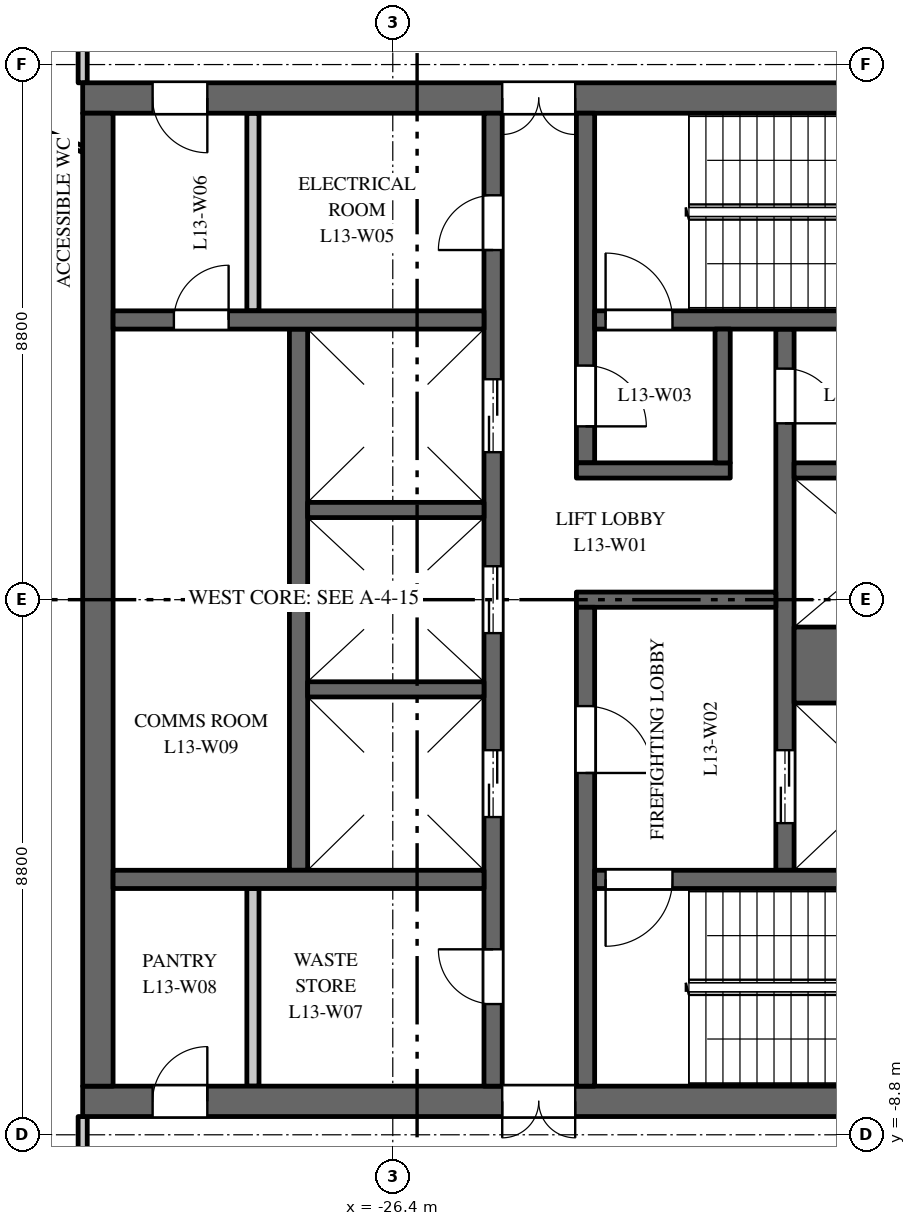
"""IFC4 building model, lengths in metres.
Left out: names, types, materials, properties, quantities, classifications, styles, units other than length and angle.
Written with IfcOpenShell. Run it as: python <this file> out.ifc"""

import sys

from ifc_helpers import new_model, si_unit, direction, frame, frame_2d, origin, place, context, subcontext, project, spatial, rectangle, extrude, element, fill, save


model = new_model("IFC4")
c1 = context("Model", 3, precision=1e-05, world=origin(), true_north=direction((0.0, 1.0)))
c2 = subcontext(c1, "Body", "Model", "MODEL_VIEW")
j1 = project(units=[si_unit("LENGTHUNIT", "METRE"), si_unit("PLANEANGLEUNIT", "RADIAN")], contexts=[c1])
p1 = place(None, origin())
s1 = spatial("IfcSite", under=j1, at=p1, CompositionType="ELEMENT")
p2 = place(p1, origin())
s2 = spatial("IfcBuilding", under=s1, at=p2, CompositionType="ELEMENT")
p3 = place(p2, frame((0.0, 0.0, 62.5)))
s3 = spatial("IfcBuildingStorey", under=s2, at=p3, CompositionType="ELEMENT", Elevation=62.5)
p4 = place(p3, frame((-16.5, 8.25, 0.0), z_axis=(0.0, 0.0, 1.0), x_axis=(-1.0, 0.0, 0.0)))
e1 = element("IfcWall", 1, at=p4, inside=s3, PredefinedType="SHEAR", context=c2, shape_type="SweptSolid", body=[
    extrude(rectangle(XDim=15.0, YDim=0.5, at=frame_2d((7.5, 0.0))), origin(), (0.0, 0.0, 1.0), 3.7),
])
p5 = place(p4, frame((6.9, 0.0, 0.0)))
e2 = element("IfcOpeningElement", 2, at=p5, cuts=e1, PredefinedType="OPENING", context=c2, shape_type="SweptSolid", body=[
    extrude(rectangle(XDim=1.2, YDim=2.1, at=frame_2d((0.6, 1.05))), frame((0.0, 0.26, 0.0), z_axis=(0.0, -1.0, 0.0), x_axis=(1.0, 0.0, 0.0)), (0.0, 0.0, 1.0), 0.52),
])
p6 = place(p4, frame((12.95, 0.0, 0.0)))
e3 = element("IfcOpeningElement", 3, at=p6, cuts=e1, PredefinedType="OPENING", context=c2, shape_type="SweptSolid", body=[
    extrude(rectangle(XDim=0.9, YDim=2.1, at=frame_2d((0.45, 1.05))), frame((0.0, 0.26, 0.0), z_axis=(0.0, -1.0, 0.0), x_axis=(1.0, 0.0, 0.0)), (0.0, 0.0, 1.0), 0.52),
])
p7 = place(p3, frame((-16.5, -8.25, 0.0), z_axis=(0.0, 0.0, 1.0), x_axis=(-1.0, 0.0, 0.0)))
e4 = element("IfcWall", 4, at=p7, inside=s3, PredefinedType="SHEAR", context=c2, shape_type="SweptSolid", body=[
    extrude(rectangle(XDim=15.0, YDim=0.5, at=frame_2d((7.5, 0.0))), origin(), (0.0, 0.0, 1.0), 3.7),
])
p8 = place(p7, frame((6.9, 0.0, 0.0)))
e5 = element("IfcOpeningElement", 5, at=p8, cuts=e4, PredefinedType="OPENING", context=c2, shape_type="SweptSolid", body=[
    extrude(rectangle(XDim=1.2, YDim=2.1, at=frame_2d((0.6, 1.05))), frame((0.0, 0.26, 0.0), z_axis=(0.0, -1.0, 0.0), x_axis=(1.0, 0.0, 0.0)), (0.0, 0.0, 1.0), 0.52),
])
p9 = place(p7, frame((12.95, 0.0, 0.0)))
e6 = element("IfcOpeningElement", 6, at=p9, cuts=e4, PredefinedType="OPENING", context=c2, shape_type="SweptSolid", body=[
    extrude(rectangle(XDim=0.9, YDim=2.1, at=frame_2d((0.45, 1.05))), frame((0.0, 0.26, 0.0), z_axis=(0.0, -1.0, 0.0), x_axis=(1.0, 0.0, 0.0)), (0.0, 0.0, 1.0), 0.52),
])
p10 = place(p3, frame((-27.95, -4.45, 0.0), z_axis=(0.0, 0.0, 1.0), x_axis=(0.0, 1.0, 0.0)))
e7 = element("IfcWall", 7, at=p10, inside=s3, PredefinedType="SHEAR", context=c2, shape_type="SweptSolid", body=[
    extrude(rectangle(XDim=8.9, YDim=0.3, at=frame_2d((4.45, 0.0))), origin(), (0.0, 0.0, 1.0), 3.7),
])
p11 = place(p3, frame((-19.95, -4.45, 0.0), z_axis=(0.0, 0.0, 1.0), x_axis=(0.0, 1.0, 0.0)))
e8 = element("IfcWall", 8, at=p11, inside=s3, PredefinedType="SHEAR", context=c2, shape_type="SweptSolid", body=[
    extrude(rectangle(XDim=8.9, YDim=0.3, at=frame_2d((4.45, 0.0))), origin(), (0.0, 0.0, 1.0), 3.7),
])
p12 = place(p11, frame((0.775, 0.0, 0.0)))
e9 = element("IfcOpeningElement", 9, at=p12, cuts=e8, PredefinedType="OPENING", context=c2, shape_type="SweptSolid", body=[
    extrude(rectangle(XDim=1.2, YDim=2.1, at=frame_2d((0.6, 1.05))), frame((0.0, 0.16, 0.0), z_axis=(0.0, -1.0, 0.0), x_axis=(1.0, 0.0, 0.0)), (0.0, 0.0, 1.0), 0.32),
])
p13 = place(p11, frame((7.35, 0.0, 0.0)))
e10 = element("IfcOpeningElement", 10, at=p13, cuts=e8, PredefinedType="OPENING", context=c2, shape_type="SweptSolid", body=[
    extrude(rectangle(XDim=0.9, YDim=2.1, at=frame_2d((0.45, 1.05))), frame((0.0, 0.16, 0.0), z_axis=(0.0, -1.0, 0.0), x_axis=(1.0, 0.0, 0.0)), (0.0, 0.0, 1.0), 0.32),
])
p14 = place(p3, frame((-24.75, -8.0, 0.0), z_axis=(0.0, 0.0, 1.0), x_axis=(0.0, 1.0, 0.0)))
e11 = element("IfcWall", 11, at=p14, inside=s3, PredefinedType="SHEAR", context=c2, shape_type="SweptSolid", body=[
    extrude(rectangle(XDim=16.0, YDim=0.3, at=frame_2d((8.0, 0.0))), origin(), (0.0, 0.0, 1.0), 3.7),
])
p15 = place(p14, frame((4.425, 0.0, 0.0)))
e12 = element("IfcOpeningElement", 12, at=p15, cuts=e11, PredefinedType="OPENING", context=c2, shape_type="SweptSolid", body=[
    extrude(rectangle(XDim=1.1, YDim=2.1, at=frame_2d((0.55, 1.05))), frame((0.0, 0.16, 0.0), z_axis=(0.0, -1.0, 0.0), x_axis=(1.0, 0.0, 0.0)), (0.0, 0.0, 1.0), 0.32),
])
p16 = place(p14, frame((7.45, 0.0, 0.0)))
e13 = element("IfcOpeningElement", 13, at=p16, cuts=e11, PredefinedType="OPENING", context=c2, shape_type="SweptSolid", body=[
    extrude(rectangle(XDim=1.1, YDim=2.1, at=frame_2d((0.55, 1.05))), frame((0.0, 0.16, 0.0), z_axis=(0.0, -1.0, 0.0), x_axis=(1.0, 0.0, 0.0)), (0.0, 0.0, 1.0), 0.32),
])
p17 = place(p14, frame((10.425, 0.0, 0.0)))
e14 = element("IfcOpeningElement", 14, at=p17, cuts=e11, PredefinedType="OPENING", context=c2, shape_type="SweptSolid", body=[
    extrude(rectangle(XDim=1.2, YDim=2.1, at=frame_2d((0.6, 1.05))), frame((0.0, 0.16, 0.0), z_axis=(0.0, -1.0, 0.0), x_axis=(1.0, 0.0, 0.0)), (0.0, 0.0, 1.0), 0.32),
])
p18 = place(p14, frame((13.75, 0.0, 0.0)))
e15 = element("IfcOpeningElement", 15, at=p18, cuts=e11, PredefinedType="OPENING", context=c2, shape_type="SweptSolid", body=[
    extrude(rectangle(XDim=0.9, YDim=2.1, at=frame_2d((0.45, 1.05))), frame((0.0, 0.16, 0.0), z_axis=(0.0, -1.0, 0.0), x_axis=(1.0, 0.0, 0.0)), (0.0, 0.0, 1.0), 0.32),
])
p19 = place(p14, frame((1.35, 0.0, 0.0)))
e16 = element("IfcOpeningElement", 16, at=p19, cuts=e11, PredefinedType="OPENING", context=c2, shape_type="SweptSolid", body=[
    extrude(rectangle(XDim=0.9, YDim=2.1, at=frame_2d((0.45, 1.05))), frame((0.0, 0.16, 0.0), z_axis=(0.0, -1.0, 0.0), x_axis=(1.0, 0.0, 0.0)), (0.0, 0.0, 1.0), 0.32),
])
p20 = place(p3, frame((-20.1, 0.0, 0.0), z_axis=(0.0, 0.0, 1.0), x_axis=(-1.0, 0.0, 0.0)))
e17 = element("IfcWall", 17, at=p20, inside=s3, PredefinedType="SHEAR", context=c2, shape_type="SweptSolid", body=[
    extrude(rectangle(XDim=3.28, YDim=0.25, at=frame_2d((1.64, 0.0))), origin(), (0.0, 0.0, 1.0), 3.7),
])
p21 = place(p3, frame((-31.25, -8.0, 0.0), z_axis=(0.0, 0.0, 1.0), x_axis=(0.0, 1.0, 0.0)))
e18 = element("IfcWall", 18, at=p21, inside=s3, PredefinedType="SHEAR", context=c2, shape_type="SweptSolid", body=[
    extrude(rectangle(XDim=16.0, YDim=0.5, at=frame_2d((8.0, 0.0))), origin(), (0.0, 0.0, 1.0), 3.7),
])
p22 = place(p3, frame((-24.9, 4.6, 0.0), z_axis=(0.0, 0.0, 1.0), x_axis=(-1.0, 0.0, 0.0)))
e19 = element("IfcWall", 19, at=p22, inside=s3, PredefinedType="SHEAR", context=c2, shape_type="SweptSolid", body=[
    extrude(rectangle(XDim=6.1, YDim=0.3, at=frame_2d((3.05, 0.0))), origin(), (0.0, 0.0, 1.0), 3.7),
])
p23 = place(p22, frame((4.2, 0.0, 0.0)))
e20 = element("IfcOpeningElement", 20, at=p23, cuts=e19, PredefinedType="OPENING", context=c2, shape_type="SweptSolid", body=[
    extrude(rectangle(XDim=0.9, YDim=2.1, at=frame_2d((0.45, 1.05))), frame((0.0, 0.16, 0.0), z_axis=(0.0, -1.0, 0.0), x_axis=(1.0, 0.0, 0.0)), (0.0, 0.0, 1.0), 0.32),
])
for number, where, z_axis, x_axis in (
    (21, (-28.7, 4.75, 0.0), (0.0, 0.0, 1.0), (0.0, 1.0, 0.0)),
    (22, (-28.7, -8.0, 0.0), (0.0, 0.0, 1.0), (0.0, 1.0, 0.0)),
):
    element("IfcWall", number, at=place(p3, frame(where, z_axis=z_axis, x_axis=x_axis)), inside=s3, PredefinedType="PARTITIONING", context=c2, shape_type="SweptSolid", body=[
        extrude(rectangle(XDim=3.25, YDim=0.2, at=frame_2d((1.625, 0.0))), origin(), (0.0, 0.0, 1.0), 3.7),
    ])
p24 = place(p3, frame((-24.9, -4.6, 0.0), z_axis=(0.0, 0.0, 1.0), x_axis=(-1.0, 0.0, 0.0)))
e23 = element("IfcWall", 23, at=p24, inside=s3, PredefinedType="SHEAR", context=c2, shape_type="SweptSolid", body=[
    extrude(rectangle(XDim=6.1, YDim=0.3, at=frame_2d((3.05, 0.0))), origin(), (0.0, 0.0, 1.0), 3.7),
])
p25 = place(p3, frame((-16.9, -1.075, 0.0), z_axis=(0.0, 0.0, 1.0), x_axis=(-1.0, 0.0, 0.0)))
e24 = element("IfcWall", 24, at=p25, inside=s3, PredefinedType="SHEAR", context=c2, shape_type="SweptSolid", body=[
    extrude(rectangle(XDim=2.9, YDim=1.25, at=frame_2d((1.45, 0.0))), origin(), (0.0, 0.0, 1.0), 3.7),
])
for number, where, z_axis, x_axis in (
    (25, (-16.9, 2.125, 0.0), (0.0, 0.0, 1.0), (-1.0, 0.0, 0.0)),
    (26, (-24.9, -1.475, 0.0), (0.0, 0.0, 1.0), (-1.0, 0.0, 0.0)),
    (27, (-24.9, 1.475, 0.0), (0.0, 0.0, 1.0), (-1.0, 0.0, 0.0)),
):
    element("IfcWall", number, at=place(p3, frame(where, z_axis=z_axis, x_axis=x_axis)), inside=s3, PredefinedType="SHEAR", context=c2, shape_type="SweptSolid", body=[
        extrude(rectangle(XDim=2.9, YDim=0.25, at=frame_2d((1.45, 0.0))), origin(), (0.0, 0.0, 1.0), 3.7),
    ])
p26 = place(p3, frame((-23.23, 2.25, 0.0), z_axis=(0.0, 0.0, 1.0), x_axis=(0.0, 1.0, 0.0)))
e28 = element("IfcWall", 28, at=p26, inside=s3, PredefinedType="SHEAR", context=c2, shape_type="SweptSolid", body=[
    extrude(rectangle(XDim=5.75, YDim=0.3, at=frame_2d((2.875, 0.0))), origin(), (0.0, 0.0, 1.0), 3.7),
])
p27 = place(p26, frame((0.6, 0.0, 0.0)))
e29 = element("IfcOpeningElement", 29, at=p27, cuts=e28, PredefinedType="OPENING", context=c2, shape_type="SweptSolid", body=[
    extrude(rectangle(XDim=1.0, YDim=2.1, at=frame_2d((0.5, 1.05))), frame((0.0, 0.16, 0.0), z_axis=(0.0, -1.0, 0.0), x_axis=(1.0, 0.0, 0.0)), (0.0, 0.0, 1.0), 0.32),
])
p28 = place(p3, frame((-23.23, -8.0, 0.0), z_axis=(0.0, 0.0, 1.0), x_axis=(0.0, 1.0, 0.0)))
e30 = element("IfcWall", 30, at=p28, inside=s3, PredefinedType="SHEAR", context=c2, shape_type="SweptSolid", body=[
    extrude(rectangle(XDim=7.875, YDim=0.3, at=frame_2d((3.938, 0.0))), origin(), (0.0, 0.0, 1.0), 3.7),
])
p29 = place(p28, frame((5.15, 0.0, 0.0)))
e31 = element("IfcOpeningElement", 31, at=p29, cuts=e30, PredefinedType="OPENING", context=c2, shape_type="SweptSolid", body=[
    extrude(rectangle(XDim=1.1, YDim=2.1, at=frame_2d((0.55, 1.05))), frame((0.0, 0.16, 0.0), z_axis=(0.0, -1.0, 0.0), x_axis=(1.0, 0.0, 0.0)), (0.0, 0.0, 1.0), 0.32),
])
p30 = place(p3, frame((-16.9, 4.6, 0.0), z_axis=(0.0, 0.0, 1.0), x_axis=(-1.0, 0.0, 0.0)))
e32 = element("IfcWall", 32, at=p30, inside=s3, PredefinedType="SHEAR", context=c2, shape_type="SweptSolid", body=[
    extrude(rectangle(XDim=6.18, YDim=0.3, at=frame_2d((3.09, 0.0))), origin(), (0.0, 0.0, 1.0), 3.7),
])
p31 = place(p30, frame((4.9, 0.0, 0.0)))
e33 = element("IfcOpeningElement", 33, at=p31, cuts=e32, PredefinedType="OPENING", context=c2, shape_type="SweptSolid", body=[
    extrude(rectangle(XDim=1.1, YDim=2.1, at=frame_2d((0.55, 1.05))), frame((0.0, 0.16, 0.0), z_axis=(0.0, -1.0, 0.0), x_axis=(1.0, 0.0, 0.0)), (0.0, 0.0, 1.0), 0.32),
])
p32 = place(p3, frame((-16.9, -4.6, 0.0), z_axis=(0.0, 0.0, 1.0), x_axis=(-1.0, 0.0, 0.0)))
e34 = element("IfcWall", 34, at=p32, inside=s3, PredefinedType="SHEAR", context=c2, shape_type="SweptSolid", body=[
    extrude(rectangle(XDim=6.18, YDim=0.3, at=frame_2d((3.09, 0.0))), origin(), (0.0, 0.0, 1.0), 3.7),
])
p33 = place(p32, frame((4.9, 0.0, 0.0)))
e35 = element("IfcOpeningElement", 35, at=p33, cuts=e34, PredefinedType="OPENING", context=c2, shape_type="SweptSolid", body=[
    extrude(rectangle(XDim=1.1, YDim=2.1, at=frame_2d((0.55, 1.05))), frame((0.0, 0.16, 0.0), z_axis=(0.0, -1.0, 0.0), x_axis=(1.0, 0.0, 0.0)), (0.0, 0.0, 1.0), 0.32),
])
p34 = place(p3, frame((-20.85, 2.125, 0.0), z_axis=(0.0, 0.0, 1.0), x_axis=(-1.0, 0.0, 0.0)))
e36 = element("IfcWall", 36, at=p34, inside=s3, PredefinedType="SHEAR", context=c2, shape_type="SweptSolid", body=[
    extrude(rectangle(XDim=2.53, YDim=0.25, at=frame_2d((1.265, 0.0))), origin(), (0.0, 0.0, 1.0), 3.7),
])
p35 = place(p3, frame((-20.975, 2.25, 0.0), z_axis=(0.0, 0.0, 1.0), x_axis=(0.0, 1.0, 0.0)))
e37 = element("IfcWall", 37, at=p35, inside=s3, PredefinedType="SHEAR", context=c2, shape_type="SweptSolid", body=[
    extrude(rectangle(XDim=2.2, YDim=0.25, at=frame_2d((1.1, 0.0))), origin(), (0.0, 0.0, 1.0), 3.7),
])
p36 = place(p3, frame((-34.234, 8.53, 0.0), z_axis=(0.0, 0.0, 1.0), x_axis=(0.925344112436, -0.379128307542, 0.0)))
e38 = element("IfcWall", 38, at=p36, inside=s3, PredefinedType="PARTITIONING", context=c2, shape_type="SweptSolid", body=[
    extrude(rectangle(XDim=2.954, YDim=0.1, at=frame_2d((1.477, 0.0))), origin(), (0.0, 0.0, 1.0), 2.85),
])
for number, where, z_axis, x_axis in (
    (39, (-31.5, -10.7, 0.0), (0.0, 0.0, 1.0), (0.0, 1.0, 0.0)),
    (40, (-31.5, 8.5, 0.0), (0.0, 0.0, 1.0), (0.0, 1.0, 0.0)),
):
    element("IfcWall", number, at=place(p3, frame(where, z_axis=z_axis, x_axis=x_axis)), inside=s3, PredefinedType="PARTITIONING", context=c2, shape_type="SweptSolid", body=[
        extrude(rectangle(XDim=2.2, YDim=0.15, at=frame_2d((1.1, 0.0))), origin(), (0.0, 0.0, 1.0), 3.7),
    ])
p37 = place(p12, origin())
e41 = element("IfcDoor", 41, at=p37, inside=s3, OperationType="DOUBLE_DOOR_SLIDING", PredefinedType="DOOR", context=c2, shape_type="SweptSolid", body=[
    extrude(rectangle(XDim=1.2, YDim=2.1, at=frame_2d((0.6, 1.05))), frame((0.0, 0.025, 0.0), z_axis=(0.0, -1.0, 0.0), x_axis=(1.0, 0.0, 0.0)), (0.0, 0.0, 1.0), 0.05),
])
fill(e9, e41)
p38 = place(p15, origin())
e42 = element("IfcDoor", 42, at=p38, inside=s3, OperationType="DOUBLE_DOOR_SLIDING", PredefinedType="DOOR", context=c2, shape_type="SweptSolid", body=[
    extrude(rectangle(XDim=1.1, YDim=2.1, at=frame_2d((0.55, 1.05))), frame((0.0, 0.025, 0.0), z_axis=(0.0, -1.0, 0.0), x_axis=(1.0, 0.0, 0.0)), (0.0, 0.0, 1.0), 0.05),
])
fill(e12, e42)
p39 = place(p16, origin())
e43 = element("IfcDoor", 43, at=p39, inside=s3, OperationType="DOUBLE_DOOR_SLIDING", PredefinedType="DOOR", context=c2, shape_type="SweptSolid", body=[
    extrude(rectangle(XDim=1.1, YDim=2.1, at=frame_2d((0.55, 1.05))), frame((0.0, 0.025, 0.0), z_axis=(0.0, -1.0, 0.0), x_axis=(1.0, 0.0, 0.0)), (0.0, 0.0, 1.0), 0.05),
])
fill(e13, e43)
p40 = place(p17, origin())
e44 = element("IfcDoor", 44, at=p40, inside=s3, OperationType="DOUBLE_DOOR_SLIDING", PredefinedType="DOOR", context=c2, shape_type="SweptSolid", body=[
    extrude(rectangle(XDim=1.2, YDim=2.1, at=frame_2d((0.6, 1.05))), frame((0.0, 0.025, 0.0), z_axis=(0.0, -1.0, 0.0), x_axis=(1.0, 0.0, 0.0)), (0.0, 0.0, 1.0), 0.05),
])
fill(e14, e44)
p41 = place(p31, origin())
e45 = element("IfcDoor", 45, at=p41, inside=s3, OperationType="SINGLE_SWING_RIGHT", PredefinedType="DOOR", context=c2, shape_type="SweptSolid", body=[
    extrude(rectangle(XDim=1.1, YDim=2.1, at=frame_2d((0.55, 1.05))), frame((0.0, 0.025, 0.0), z_axis=(0.0, -1.0, 0.0), x_axis=(1.0, 0.0, 0.0)), (0.0, 0.0, 1.0), 0.05),
])
fill(e33, e45)
p42 = place(p33, origin())
e46 = element("IfcDoor", 46, at=p42, inside=s3, OperationType="SINGLE_SWING_LEFT", PredefinedType="DOOR", context=c2, shape_type="SweptSolid", body=[
    extrude(rectangle(XDim=1.1, YDim=2.1, at=frame_2d((0.55, 1.05))), frame((0.0, 0.025, 0.0), z_axis=(0.0, -1.0, 0.0), x_axis=(1.0, 0.0, 0.0)), (0.0, 0.0, 1.0), 0.05),
])
fill(e35, e46)
p43 = place(p29, origin())
e47 = element("IfcDoor", 47, at=p43, inside=s3, OperationType="SINGLE_SWING_LEFT", PredefinedType="DOOR", context=c2, shape_type="SweptSolid", body=[
    extrude(rectangle(XDim=1.1, YDim=2.1, at=frame_2d((0.55, 1.05))), frame((0.0, 0.025, 0.0), z_axis=(0.0, -1.0, 0.0), x_axis=(1.0, 0.0, 0.0)), (0.0, 0.0, 1.0), 0.05),
])
fill(e31, e47)
p44 = place(p27, origin())
e48 = element("IfcDoor", 48, at=p44, inside=s3, OperationType="SINGLE_SWING_LEFT", PredefinedType="DOOR", context=c2, shape_type="SweptSolid", body=[
    extrude(rectangle(XDim=1.0, YDim=2.1, at=frame_2d((0.5, 1.05))), frame((0.0, 0.025, 0.0), z_axis=(0.0, -1.0, 0.0), x_axis=(1.0, 0.0, 0.0)), (0.0, 0.0, 1.0), 0.05),
])
fill(e29, e48)
p45 = place(p5, origin())
e49 = element("IfcDoor", 49, at=p45, inside=s3, OperationType="DOUBLE_DOOR_DOUBLE_SWING", PredefinedType="DOOR", context=c2, shape_type="SweptSolid", body=[
    extrude(rectangle(XDim=1.2, YDim=2.1, at=frame_2d((0.6, 1.05))), frame((0.0, 0.025, 0.0), z_axis=(0.0, -1.0, 0.0), x_axis=(1.0, 0.0, 0.0)), (0.0, 0.0, 1.0), 0.05),
])
fill(e2, e49)
p46 = place(p8, origin())
e50 = element("IfcDoor", 50, at=p46, inside=s3, OperationType="DOUBLE_DOOR_DOUBLE_SWING", PredefinedType="DOOR", context=c2, shape_type="SweptSolid", body=[
    extrude(rectangle(XDim=1.2, YDim=2.1, at=frame_2d((0.6, 1.05))), frame((0.0, 0.025, 0.0), z_axis=(0.0, -1.0, 0.0), x_axis=(1.0, 0.0, 0.0)), (0.0, 0.0, 1.0), 0.05),
])
fill(e5, e50)
p47 = place(p13, origin())
e51 = element("IfcDoor", 51, at=p47, inside=s3, OperationType="SINGLE_SWING_LEFT", PredefinedType="DOOR", context=c2, shape_type="SweptSolid", body=[
    extrude(rectangle(XDim=0.9, YDim=2.1, at=frame_2d((0.45, 1.05))), frame((0.0, 0.025, 0.0), z_axis=(0.0, -1.0, 0.0), x_axis=(1.0, 0.0, 0.0)), (0.0, 0.0, 1.0), 0.05),
])
fill(e10, e51)
p48 = place(p18, origin())
e52 = element("IfcDoor", 52, at=p48, inside=s3, OperationType="SINGLE_SWING_RIGHT", PredefinedType="DOOR", context=c2, shape_type="SweptSolid", body=[
    extrude(rectangle(XDim=0.9, YDim=2.1, at=frame_2d((0.45, 1.05))), frame((0.0, 0.025, 0.0), z_axis=(0.0, -1.0, 0.0), x_axis=(1.0, 0.0, 0.0)), (0.0, 0.0, 1.0), 0.05),
])
fill(e15, e52)
p49 = place(p6, origin())
e53 = element("IfcDoor", 53, at=p49, inside=s3, OperationType="SINGLE_SWING_RIGHT", PredefinedType="DOOR", context=c2, shape_type="SweptSolid", body=[
    extrude(rectangle(XDim=0.9, YDim=2.1, at=frame_2d((0.45, 1.05))), frame((0.0, 0.025, 0.0), z_axis=(0.0, -1.0, 0.0), x_axis=(1.0, 0.0, 0.0)), (0.0, 0.0, 1.0), 0.05),
])
fill(e3, e53)
p50 = place(p19, origin())
e54 = element("IfcDoor", 54, at=p50, inside=s3, OperationType="SINGLE_SWING_LEFT", PredefinedType="DOOR", context=c2, shape_type="SweptSolid", body=[
    extrude(rectangle(XDim=0.9, YDim=2.1, at=frame_2d((0.45, 1.05))), frame((0.0, 0.025, 0.0), z_axis=(0.0, -1.0, 0.0), x_axis=(1.0, 0.0, 0.0)), (0.0, 0.0, 1.0), 0.05),
])
fill(e16, e54)
p51 = place(p9, origin())
e55 = element("IfcDoor", 55, at=p51, inside=s3, OperationType="SINGLE_SWING_LEFT", PredefinedType="DOOR", context=c2, shape_type="SweptSolid", body=[
    extrude(rectangle(XDim=0.9, YDim=2.1, at=frame_2d((0.45, 1.05))), frame((0.0, 0.025, 0.0), z_axis=(0.0, -1.0, 0.0), x_axis=(1.0, 0.0, 0.0)), (0.0, 0.0, 1.0), 0.05),
])
fill(e6, e55)
p52 = place(p23, origin())
e56 = element("IfcDoor", 56, at=p52, inside=s3, OperationType="SINGLE_SWING_LEFT", PredefinedType="DOOR", context=c2, shape_type="SweptSolid", body=[
    extrude(rectangle(XDim=0.9, YDim=2.1, at=frame_2d((0.45, 1.05))), frame((0.0, 0.025, 0.0), z_axis=(0.0, -1.0, 0.0), x_axis=(1.0, 0.0, 0.0)), (0.0, 0.0, 1.0), 0.05),
])
fill(e20, e56)
save(model, sys.argv[1])
